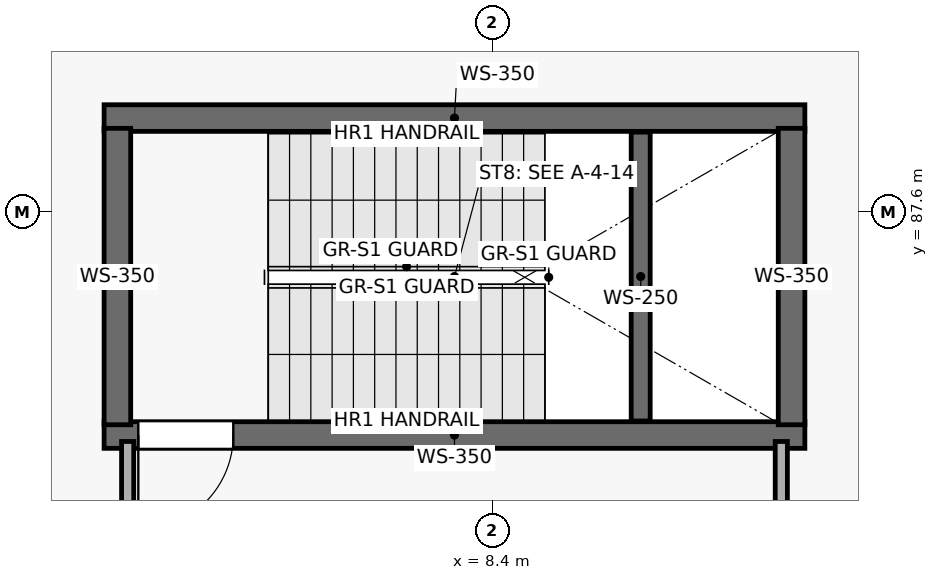
"""IFC4 building model, lengths in metres.
Left out: names, types, materials, properties, quantities, classifications, styles, units other than length and angle.
Written with IfcOpenShell. Run it as: python <this file> out.ifc"""

import sys

from ifc_helpers import new_model, si_unit, direction, frame, frame_2d, origin, place, context, subcontext, project, spatial, rectangle, extrude, element, fill, save


model = new_model("IFC4")
c1 = context("Model", 3, precision=1e-05, world=origin(), true_north=direction((0.0, 1.0)))
c2 = subcontext(c1, "Body", "Model", "MODEL_VIEW")
j1 = project(units=[si_unit("LENGTHUNIT", "METRE"), si_unit("PLANEANGLEUNIT", "RADIAN")], contexts=[c1])
p1 = place(None, origin())
s1 = spatial("IfcSite", under=j1, at=p1, CompositionType="ELEMENT")
p2 = place(p1, origin())
s2 = spatial("IfcBuilding", under=s1, at=p2, CompositionType="ELEMENT")
p3 = place(p2, frame((0.0, 0.0, 10.2)))
s3 = spatial("IfcBuildingStorey", under=s2, at=p3, CompositionType="ELEMENT", Elevation=10.2)
p4 = place(p3, frame((3.29, 84.665, 0.0), z_axis=(0.0, 0.0, 1.0), x_axis=(1.0, 0.0, 0.0)))
e1 = element("IfcWall", 1, at=p4, inside=s3, PredefinedType="SHEAR", context=c2, shape_type="SweptSolid", body=[
    extrude(rectangle(XDim=9.22, YDim=0.35, at=frame_2d((4.61, 0.0))), origin(), (0.0, 0.0, 1.0), 4.82),
])
p5 = place(p4, frame((0.45, 0.0, 0.0)))
e2 = element("IfcOpeningElement", 2, at=p5, cuts=e1, PredefinedType="OPENING", context=c2, shape_type="SweptSolid", body=[
    extrude(rectangle(XDim=1.25, YDim=2.2, at=frame_2d((0.625, 1.1))), frame((0.0, 0.185, 0.0), z_axis=(0.0, -1.0, 0.0), x_axis=(1.0, 0.0, 0.0)), (0.0, 0.0, 1.0), 0.37),
])
p6 = place(p3, frame((12.51, 88.835, 0.0), z_axis=(0.0, 0.0, 1.0), x_axis=(-1.0, 0.0, 0.0)))
e3 = element("IfcWall", 3, at=p6, inside=s3, PredefinedType="SHEAR", context=c2, shape_type="SweptSolid", body=[
    extrude(rectangle(XDim=9.22, YDim=0.35, at=frame_2d((4.61, 0.0))), origin(), (0.0, 0.0, 1.0), 4.82),
])
for number, where, z_axis, x_axis in (
    (4, (3.465, 84.8, 0.0), (0.0, 0.0, 1.0), (0.0, 1.0, 0.0)),
    (5, (12.335, 88.7, 0.0), (0.0, 0.0, 1.0), (0.0, -1.0, 0.0)),
):
    element("IfcWall", number, at=place(p3, frame(where, z_axis=z_axis, x_axis=x_axis)), inside=s3, PredefinedType="SHEAR", context=c2, shape_type="SweptSolid", body=[
        extrude(rectangle(XDim=3.9, YDim=0.35, at=frame_2d((1.95, 0.0))), origin(), (0.0, 0.0, 1.0), 4.82),
    ])
p7 = place(p3, frame((10.35, 84.85, 0.0), z_axis=(0.0, 0.0, 1.0), x_axis=(0.0, 1.0, 0.0)))
e6 = element("IfcWall", 6, at=p7, inside=s3, PredefinedType="SHEAR", context=c2, shape_type="SweptSolid", body=[
    extrude(rectangle(XDim=3.8, YDim=0.25, at=frame_2d((1.9, 0.0))), origin(), (0.0, 0.0, 1.0), 2.37),
])
p8 = place(p3, frame((12.2, 81.8, 0.0), z_axis=(0.0, 0.0, 1.0), x_axis=(0.0, 1.0, 0.0)))
e7 = element("IfcWall", 7, at=p8, inside=s3, PredefinedType="PARTITIONING", context=c2, shape_type="SweptSolid", body=[
    extrude(rectangle(XDim=2.78, YDim=0.16, at=frame_2d((1.39, 0.0))), origin(), (0.0, 0.0, 1.0), 4.82),
])
p9 = place(p3, frame((3.6, 84.58, 0.0), z_axis=(0.0, 0.0, 1.0), x_axis=(0.0, -1.0, 0.0)))
e8 = element("IfcWall", 8, at=p9, inside=s3, PredefinedType="PARTITIONING", context=c2, shape_type="SweptSolid", body=[
    extrude(rectangle(XDim=2.62, YDim=0.16, at=frame_2d((1.31, 0.0))), origin(), (0.0, 0.0, 1.0), 4.82),
])
p10 = place(p5, origin())
e9 = element("IfcDoor", 9, at=p10, inside=s3, OperationType="SINGLE_SWING_RIGHT", PredefinedType="DOOR", context=c2, shape_type="SweptSolid", body=[
    extrude(rectangle(XDim=1.25, YDim=2.2, at=frame_2d((0.625, 1.1))), frame((0.0, 0.025, 0.0), z_axis=(0.0, -1.0, 0.0), x_axis=(1.0, 0.0, 0.0)), (0.0, 0.0, 1.0), 0.05),
])
fill(e2, e9)
save(model, sys.argv[1])
